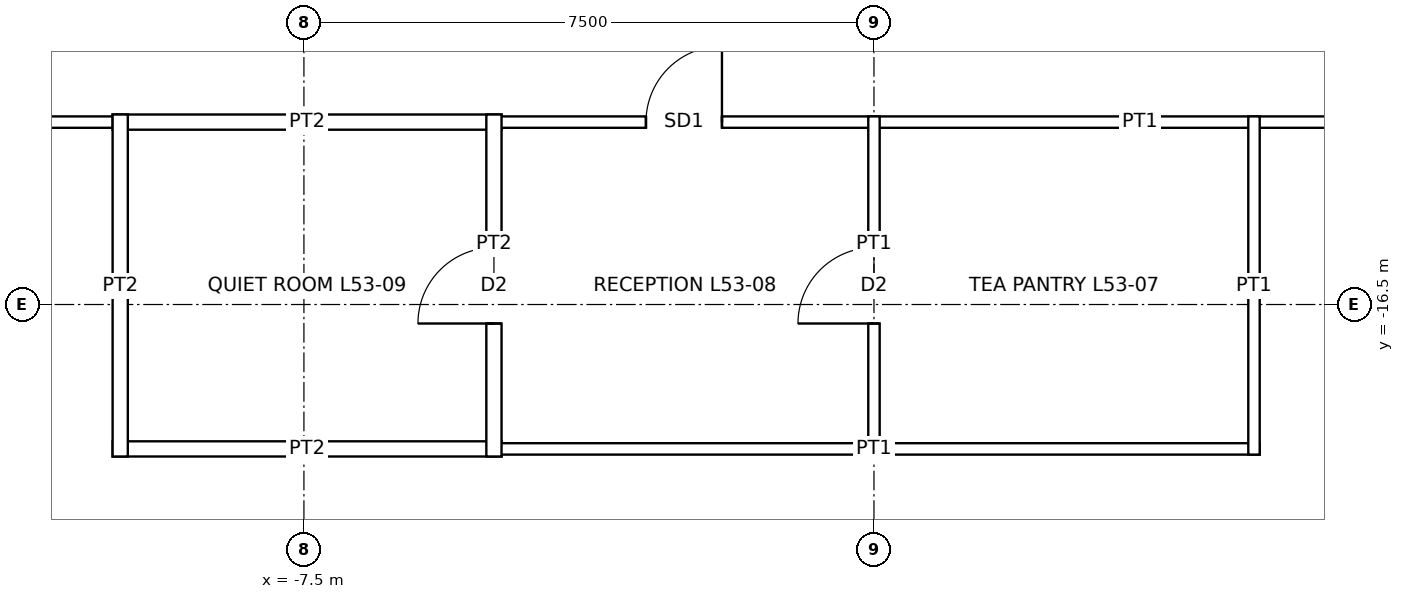
"""IFC4 building model, lengths in metres.
Left out: names, types, materials, properties, quantities, classifications, styles, units other than length and angle.
Written with IfcOpenShell. Run it as: python <this file> out.ifc"""

import sys

from ifc_helpers import new_model, si_unit, direction, frame, frame_2d, origin, place, context, subcontext, project, spatial, rectangle, extrude, element, fill, save


model = new_model("IFC4")
c1 = context("Model", 3, precision=1e-05, world=origin(), true_north=direction((0.0, 1.0)))
c2 = subcontext(c1, "Body", "Model", "MODEL_VIEW")
j1 = project(units=[si_unit("LENGTHUNIT", "METRE"), si_unit("PLANEANGLEUNIT", "RADIAN")], contexts=[c1])
p1 = place(None, origin())
s1 = spatial("IfcSite", under=j1, at=p1, CompositionType="ELEMENT")
p2 = place(p1, origin())
s2 = spatial("IfcBuilding", under=s1, at=p2, CompositionType="ELEMENT")
p3 = place(p2, frame((0.0, 0.0, 245.9)))
s3 = spatial("IfcBuildingStorey", under=s2, at=p3, CompositionType="ELEMENT", Elevation=245.9)
p4 = place(p3, frame((-10.017, -18.4, 0.0), z_axis=(0.0, 0.0, 1.0), x_axis=(1.0, 0.0, 0.0)))
e1 = element("IfcWall", 1, at=p4, inside=s3, PredefinedType="PARTITIONING", context=c2, shape_type="SweptSolid", body=[
    extrude(rectangle(XDim=5.117, YDim=0.2, at=frame_2d((2.559, 0.0))), origin(), (0.0, 0.0, 1.0), 3.85),
])
p5 = place(p3, frame((-5.075, -18.4, 0.0), z_axis=(0.0, 0.0, 1.0), x_axis=(1.0, 0.0, 0.0)))
e2 = element("IfcWall", 2, at=p5, inside=s3, PredefinedType="PARTITIONING", context=c2, shape_type="SweptSolid", body=[
    extrude(rectangle(XDim=10.15, YDim=0.15, at=frame_2d((5.075, 0.0))), origin(), (0.0, 0.0, 1.0), 3.85),
])
p6 = place(p3, frame((-14.175, -14.1, 0.0), z_axis=(0.0, 0.0, 1.0), x_axis=(1.0, 0.0, 0.0)))
e3 = element("IfcWall", 3, at=p6, inside=s3, PredefinedType="PARTITIONING", context=c2, shape_type="SweptSolid", body=[
    extrude(rectangle(XDim=4.333, YDim=0.15, at=frame_2d((2.167, 0.0))), origin(), (0.0, 0.0, 1.0), 3.85),
])
p7 = place(p3, frame((-10.017, -14.1, 0.0), z_axis=(0.0, 0.0, 1.0), x_axis=(1.0, 0.0, 0.0)))
e4 = element("IfcWall", 4, at=p7, inside=s3, PredefinedType="PARTITIONING", context=c2, shape_type="SweptSolid", body=[
    extrude(rectangle(XDim=5.117, YDim=0.2, at=frame_2d((2.559, 0.0))), origin(), (0.0, 0.0, 1.0), 3.85),
])
p8 = place(p3, frame((-5.075, -14.1, 0.0), z_axis=(0.0, 0.0, 1.0), x_axis=(1.0, 0.0, 0.0)))
e5 = element("IfcWall", 5, at=p8, inside=s3, PredefinedType="PARTITIONING", context=c2, shape_type="SweptSolid", body=[
    extrude(rectangle(XDim=17.15, YDim=0.15, at=frame_2d((8.575, 0.0))), origin(), (0.0, 0.0, 1.0), 3.85),
])
p9 = place(p8, frame((2.075, 0.0, 0.0)))
e6 = element("IfcOpeningElement", 6, at=p9, cuts=e5, PredefinedType="OPENING", context=c2, shape_type="SweptSolid", body=[
    extrude(rectangle(XDim=1.0, YDim=2.4, at=frame_2d((0.5, 1.2))), frame((0.0, 0.085, 0.0), z_axis=(0.0, -1.0, 0.0), x_axis=(1.0, 0.0, 0.0)), (0.0, 0.0, 1.0), 0.17),
])
p10 = place(p3, frame((-9.917, -18.5, 0.0), z_axis=(0.0, 0.0, 1.0), x_axis=(0.0, 1.0, 0.0)))
e7 = element("IfcWall", 7, at=p10, inside=s3, PredefinedType="PARTITIONING", context=c2, shape_type="SweptSolid", body=[
    extrude(rectangle(XDim=4.5, YDim=0.2, at=frame_2d((2.25, 0.0))), origin(), (0.0, 0.0, 1.0), 3.85),
])
p11 = place(p3, frame((-5.0, -18.5, 0.0), z_axis=(0.0, 0.0, 1.0), x_axis=(0.0, 1.0, 0.0)))
e8 = element("IfcWall", 8, at=p11, inside=s3, PredefinedType="PARTITIONING", context=c2, shape_type="SweptSolid", body=[
    extrude(rectangle(XDim=4.5, YDim=0.2, at=frame_2d((2.25, 0.0))), origin(), (0.0, 0.0, 1.0), 3.85),
])
p12 = place(p11, frame((1.75, 0.0, 0.0)))
e9 = element("IfcOpeningElement", 9, at=p12, cuts=e8, PredefinedType="OPENING", context=c2, shape_type="SweptSolid", body=[
    extrude(rectangle(XDim=1.0, YDim=2.1, at=frame_2d((0.5, 1.05))), frame((0.0, 0.11, 0.0), z_axis=(0.0, -1.0, 0.0), x_axis=(1.0, 0.0, 0.0)), (0.0, 0.0, 1.0), 0.22),
])
p13 = place(p3, frame((0.0, -18.475, 0.0), z_axis=(0.0, 0.0, 1.0), x_axis=(0.0, 1.0, 0.0)))
e10 = element("IfcWall", 10, at=p13, inside=s3, PredefinedType="PARTITIONING", context=c2, shape_type="SweptSolid", body=[
    extrude(rectangle(XDim=4.45, YDim=0.15, at=frame_2d((2.225, 0.0))), origin(), (0.0, 0.0, 1.0), 3.238),
])
p14 = place(p13, frame((1.725, 0.0, 0.0)))
e11 = element("IfcOpeningElement", 11, at=p14, cuts=e10, PredefinedType="OPENING", context=c2, shape_type="SweptSolid", body=[
    extrude(rectangle(XDim=1.0, YDim=2.1, at=frame_2d((0.5, 1.05))), frame((0.0, 0.085, 0.0), z_axis=(0.0, -1.0, 0.0), x_axis=(1.0, 0.0, 0.0)), (0.0, 0.0, 1.0), 0.17),
])
p15 = place(p3, frame((5.0, -18.475, 0.0), z_axis=(0.0, 0.0, 1.0), x_axis=(0.0, 1.0, 0.0)))
e12 = element("IfcWall", 12, at=p15, inside=s3, PredefinedType="PARTITIONING", context=c2, shape_type="SweptSolid", body=[
    extrude(rectangle(XDim=4.45, YDim=0.15, at=frame_2d((2.225, 0.0))), origin(), (0.0, 0.0, 1.0), 3.85),
])
p16 = place(p14, origin())
e13 = element("IfcDoor", 13, at=p16, inside=s3, OperationType="SINGLE_SWING_LEFT", PredefinedType="DOOR", context=c2, shape_type="SweptSolid", body=[
    extrude(rectangle(XDim=1.0, YDim=2.1, at=frame_2d((0.5, 1.05))), frame((0.0, 0.025, 0.0), z_axis=(0.0, -1.0, 0.0), x_axis=(1.0, 0.0, 0.0)), (0.0, 0.0, 1.0), 0.05),
])
fill(e11, e13)
p17 = place(p9, origin())
e14 = element("IfcDoor", 14, at=p17, inside=s3, OperationType="SINGLE_SWING_RIGHT", PredefinedType="DOOR", context=c2, shape_type="SweptSolid", body=[
    extrude(rectangle(XDim=1.0, YDim=2.4, at=frame_2d((0.5, 1.2))), frame((0.0, 0.025, 0.0), z_axis=(0.0, -1.0, 0.0), x_axis=(1.0, 0.0, 0.0)), (0.0, 0.0, 1.0), 0.05),
])
fill(e6, e14)
p18 = place(p12, origin())
e15 = element("IfcDoor", 15, at=p18, inside=s3, OperationType="SINGLE_SWING_LEFT", PredefinedType="DOOR", context=c2, shape_type="SweptSolid", body=[
    extrude(rectangle(XDim=1.0, YDim=2.1, at=frame_2d((0.5, 1.05))), frame((0.0, 0.025, 0.0), z_axis=(0.0, -1.0, 0.0), x_axis=(1.0, 0.0, 0.0)), (0.0, 0.0, 1.0), 0.05),
])
fill(e9, e15)
save(model, sys.argv[1])
